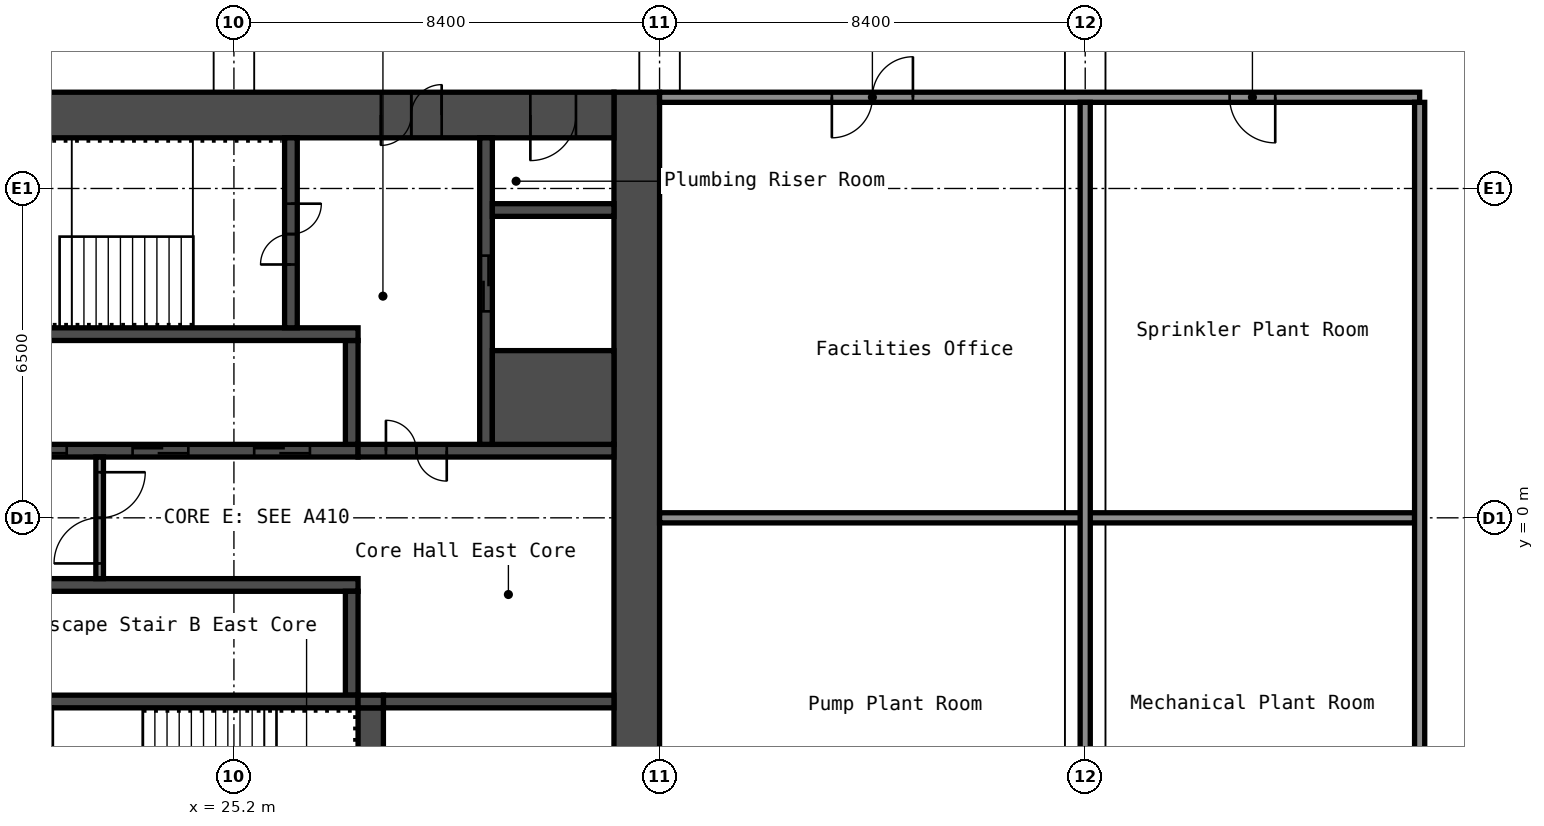
"""IFC4 building model, lengths in metres.
Left out: names, types, materials, properties, quantities, classifications, styles, units other than length and angle.
Written with IfcOpenShell. Run it as: python <this file> out.ifc"""

import sys

from ifc_helpers import new_model, si_unit, direction, frame, frame_2d, origin, place, context, subcontext, project, spatial, rectangle, extrude, element, fill, save


model = new_model("IFC4")
c1 = context("Model", 3, precision=1e-05, world=origin(), true_north=direction((0.0, 1.0)))
c2 = subcontext(c1, "Body", "Model", "MODEL_VIEW")
j1 = project(units=[si_unit("LENGTHUNIT", "METRE"), si_unit("PLANEANGLEUNIT", "RADIAN")], contexts=[c1])
p1 = place(None, origin())
s1 = spatial("IfcSite", under=j1, at=p1, CompositionType="ELEMENT")
p2 = place(p1, origin())
s2 = spatial("IfcBuilding", under=s1, at=p2, CompositionType="ELEMENT")
p3 = place(p2, frame((0.0, 0.0, 64.6)))
s3 = spatial("IfcBuildingStorey", under=s2, at=p3, CompositionType="ELEMENT", Elevation=64.6)
p4 = place(p3, frame((33.15, -8.4, 0.0), z_axis=(0.0, 0.0, 1.0), x_axis=(0.0, 1.0, 0.0)))
e1 = element("IfcWall", 1, at=p4, inside=s3, PredefinedType="SHEAR", context=c2, shape_type="SweptSolid", body=[
    extrude(rectangle(XDim=16.8, YDim=0.9, at=frame_2d((8.4, 0.0))), origin(), (0.0, 0.0, 1.0), 4.1),
])
p5 = place(p3, frame((17.7, 7.95, 0.0), z_axis=(0.0, 0.0, 1.0), x_axis=(1.0, 0.0, 0.0)))
e2 = element("IfcWall", 2, at=p5, inside=s3, PredefinedType="SHEAR", context=c2, shape_type="SweptSolid", body=[
    extrude(rectangle(XDim=15.0, YDim=0.9, at=frame_2d((7.5, 0.0))), origin(), (0.0, 0.0, 1.0), 4.1),
])
p6 = place(p5, frame((10.4, 0.0, 0.0)))
e3 = element("IfcOpeningElement", 3, at=p6, cuts=e2, PredefinedType="OPENING", context=c2, shape_type="SweptSolid", body=[
    extrude(rectangle(XDim=1.2, YDim=2.1, at=frame_2d((0.6, 1.05))), frame((0.0, 0.46, 0.0), z_axis=(0.0, -1.0, 0.0), x_axis=(1.0, 0.0, 0.0)), (0.0, 0.0, 1.0), 0.92),
])
p7 = place(p5, frame((13.35, 0.0, 0.0)))
e4 = element("IfcOpeningElement", 4, at=p7, cuts=e2, PredefinedType="OPENING", context=c2, shape_type="SweptSolid", body=[
    extrude(rectangle(XDim=0.9, YDim=2.1, at=frame_2d((0.45, 1.05))), frame((0.0, 0.46, 0.0), z_axis=(0.0, -1.0, 0.0), x_axis=(1.0, 0.0, 0.0)), (0.0, 0.0, 1.0), 0.92),
])
p8 = place(p3, frame((20.15, 1.325, 0.0), z_axis=(0.0, 0.0, 1.0), x_axis=(1.0, 0.0, 0.0)))
e5 = element("IfcWall", 5, at=p8, inside=s3, PredefinedType="SHEAR", context=c2, shape_type="SweptSolid", body=[
    extrude(rectangle(XDim=7.5, YDim=0.25, at=frame_2d((3.75, 0.0))), origin(), (0.0, 0.0, 1.0), 4.1),
])
p9 = place(p8, frame((0.65, 0.0, 0.0)))
e6 = element("IfcOpeningElement", 6, at=p9, cuts=e5, PredefinedType="OPENING", context=c2, shape_type="SweptSolid", body=[
    extrude(rectangle(XDim=1.1, YDim=2.1, at=frame_2d((0.55, 1.05))), frame((0.0, 0.135, 0.0), z_axis=(0.0, -1.0, 0.0), x_axis=(1.0, 0.0, 0.0)), (0.0, 0.0, 1.0), 0.27),
])
p10 = place(p8, frame((3.05, 0.0, 0.0)))
e7 = element("IfcOpeningElement", 7, at=p10, cuts=e5, PredefinedType="OPENING", context=c2, shape_type="SweptSolid", body=[
    extrude(rectangle(XDim=1.1, YDim=2.1, at=frame_2d((0.55, 1.05))), frame((0.0, 0.135, 0.0), z_axis=(0.0, -1.0, 0.0), x_axis=(1.0, 0.0, 0.0)), (0.0, 0.0, 1.0), 0.27),
])
p11 = place(p8, frame((5.45, 0.0, 0.0)))
e8 = element("IfcOpeningElement", 8, at=p11, cuts=e5, PredefinedType="OPENING", context=c2, shape_type="SweptSolid", body=[
    extrude(rectangle(XDim=1.1, YDim=2.1, at=frame_2d((0.55, 1.05))), frame((0.0, 0.135, 0.0), z_axis=(0.0, -1.0, 0.0), x_axis=(1.0, 0.0, 0.0)), (0.0, 0.0, 1.0), 0.27),
])
p12 = place(p3, frame((27.525, 1.45, 0.0), z_axis=(0.0, 0.0, 1.0), x_axis=(0.0, 1.0, 0.0)))
e9 = element("IfcWall", 9, at=p12, inside=s3, PredefinedType="SHEAR", context=c2, shape_type="SweptSolid", body=[
    extrude(rectangle(XDim=2.05, YDim=0.25, at=frame_2d((1.025, 0.0))), origin(), (0.0, 0.0, 1.0), 4.1),
])
p13 = place(p3, frame((20.15, 3.625, 0.0), z_axis=(0.0, 0.0, 1.0), x_axis=(1.0, 0.0, 0.0)))
e10 = element("IfcWall", 10, at=p13, inside=s3, PredefinedType="SHEAR", context=c2, shape_type="SweptSolid", body=[
    extrude(rectangle(XDim=7.5, YDim=0.25, at=frame_2d((3.75, 0.0))), origin(), (0.0, 0.0, 1.0), 4.1),
])
p14 = place(p3, frame((26.325, 3.75, 0.0), z_axis=(0.0, 0.0, 1.0), x_axis=(0.0, 1.0, 0.0)))
e11 = element("IfcWall", 11, at=p14, inside=s3, PredefinedType="SHEAR", context=c2, shape_type="SweptSolid", body=[
    extrude(rectangle(XDim=3.75, YDim=0.25, at=frame_2d((1.875, 0.0))), origin(), (0.0, 0.0, 1.0), 4.1),
])
p15 = place(p14, frame((1.25, 0.0, 0.0)))
e12 = element("IfcOpeningElement", 12, at=p15, cuts=e11, PredefinedType="OPENING", context=c2, shape_type="SweptSolid", body=[
    extrude(rectangle(XDim=1.2, YDim=2.1, at=frame_2d((0.6, 1.05))), frame((0.0, 0.135, 0.0), z_axis=(0.0, -1.0, 0.0), x_axis=(1.0, 0.0, 0.0)), (0.0, 0.0, 1.0), 0.27),
])
p16 = place(p3, frame((27.65, 1.325, 0.0), z_axis=(0.0, 0.0, 1.0), x_axis=(1.0, 0.0, 0.0)))
e13 = element("IfcWall", 13, at=p16, inside=s3, PredefinedType="SHEAR", context=c2, shape_type="SweptSolid", body=[
    extrude(rectangle(XDim=5.05, YDim=0.25, at=frame_2d((2.525, 0.0))), origin(), (0.0, 0.0, 1.0), 4.1),
])
p17 = place(p16, frame((0.55, 0.0, 0.0)))
e14 = element("IfcOpeningElement", 14, at=p17, cuts=e13, PredefinedType="OPENING", context=c2, shape_type="SweptSolid", body=[
    extrude(rectangle(XDim=1.2, YDim=2.1, at=frame_2d((0.6, 1.05))), frame((0.0, 0.135, 0.0), z_axis=(0.0, -1.0, 0.0), x_axis=(1.0, 0.0, 0.0)), (0.0, 0.0, 1.0), 0.27),
])
p18 = place(p3, frame((30.175, 1.45, 0.0), z_axis=(0.0, 0.0, 1.0), x_axis=(0.0, 1.0, 0.0)))
e15 = element("IfcWall", 15, at=p18, inside=s3, PredefinedType="SHEAR", context=c2, shape_type="SweptSolid", body=[
    extrude(rectangle(XDim=6.05, YDim=0.25, at=frame_2d((3.025, 0.0))), origin(), (0.0, 0.0, 1.0), 4.1),
])
p19 = place(p18, frame((2.625, 0.0, 0.0)))
e16 = element("IfcOpeningElement", 16, at=p19, cuts=e15, PredefinedType="OPENING", context=c2, shape_type="SweptSolid", body=[
    extrude(rectangle(XDim=1.1, YDim=2.1, at=frame_2d((0.55, 1.05))), frame((0.0, 0.135, 0.0), z_axis=(0.0, -1.0, 0.0), x_axis=(1.0, 0.0, 0.0)), (0.0, 0.0, 1.0), 0.27),
])
p20 = place(p3, frame((30.3, 2.375, 0.0), z_axis=(0.0, 0.0, 1.0), x_axis=(1.0, 0.0, 0.0)))
e17 = element("IfcWall", 17, at=p20, inside=s3, PredefinedType="SHEAR", context=c2, shape_type="SweptSolid", body=[
    extrude(rectangle(XDim=2.4, YDim=1.85, at=frame_2d((1.2, 0.0))), origin(), (0.0, 0.0, 1.0), 4.1),
])
p21 = place(p3, frame((30.3, 6.075, 0.0), z_axis=(0.0, 0.0, 1.0), x_axis=(1.0, 0.0, 0.0)))
e18 = element("IfcWall", 18, at=p21, inside=s3, PredefinedType="SHEAR", context=c2, shape_type="SweptSolid", body=[
    extrude(rectangle(XDim=2.4, YDim=0.25, at=frame_2d((1.2, 0.0))), origin(), (0.0, 0.0, 1.0), 4.1),
])
p22 = place(p3, frame((20.15, -1.325, 0.0), z_axis=(0.0, 0.0, 1.0), x_axis=(1.0, 0.0, 0.0)))
e19 = element("IfcWall", 19, at=p22, inside=s3, PredefinedType="SHEAR", context=c2, shape_type="SweptSolid", body=[
    extrude(rectangle(XDim=7.5, YDim=0.25, at=frame_2d((3.75, 0.0))), origin(), (0.0, 0.0, 1.0), 4.1),
])
p23 = place(p3, frame((27.525, -3.5, 0.0), z_axis=(0.0, 0.0, 1.0), x_axis=(0.0, 1.0, 0.0)))
e20 = element("IfcWall", 20, at=p23, inside=s3, PredefinedType="SHEAR", context=c2, shape_type="SweptSolid", body=[
    extrude(rectangle(XDim=2.05, YDim=0.25, at=frame_2d((1.025, 0.0))), origin(), (0.0, 0.0, 1.0), 4.1),
])
p24 = place(p3, frame((20.15, -3.625, 0.0), z_axis=(0.0, 0.0, 1.0), x_axis=(1.0, 0.0, 0.0)))
e21 = element("IfcWall", 21, at=p24, inside=s3, PredefinedType="SHEAR", context=c2, shape_type="SweptSolid", body=[
    extrude(rectangle(XDim=7.5, YDim=0.25, at=frame_2d((3.75, 0.0))), origin(), (0.0, 0.0, 1.0), 4.1),
])
p25 = place(p3, frame((27.9, -7.5, 0.0), z_axis=(0.0, 0.0, 1.0), x_axis=(0.0, 1.0, 0.0)))
e22 = element("IfcWall", 22, at=p25, inside=s3, PredefinedType="SHEAR", context=c2, shape_type="SweptSolid", body=[
    extrude(rectangle(XDim=3.75, YDim=0.5, at=frame_2d((1.875, 0.0))), origin(), (0.0, 0.0, 1.0), 4.1),
])
p26 = place(p3, frame((28.15, -3.625, 0.0), z_axis=(0.0, 0.0, 1.0), x_axis=(1.0, 0.0, 0.0)))
e23 = element("IfcWall", 23, at=p26, inside=s3, PredefinedType="SHEAR", context=c2, shape_type="SweptSolid", body=[
    extrude(rectangle(XDim=4.55, YDim=0.25, at=frame_2d((2.275, 0.0))), origin(), (0.0, 0.0, 1.0), 4.1),
])
p27 = place(p3, frame((27.65, -3.625, 0.0), z_axis=(0.0, 0.0, 1.0), x_axis=(1.0, 0.0, 0.0)))
e24 = element("IfcWall", 24, at=p27, inside=s3, PredefinedType="SHEAR", context=c2, shape_type="SweptSolid", body=[
    extrude(rectangle(XDim=0.5, YDim=0.25, at=frame_2d((0.25, 0.0))), origin(), (0.0, 0.0, 1.0), 4.1),
])
p28 = place(p3, frame((22.55, -1.2, 0.0), z_axis=(0.0, 0.0, 1.0), x_axis=(0.0, 1.0, 0.0)))
e25 = element("IfcWall", 25, at=p28, inside=s3, PredefinedType="PARTITIONING", context=c2, shape_type="SweptSolid", body=[
    extrude(rectangle(XDim=2.4, YDim=0.15, at=frame_2d((1.2, 0.0))), origin(), (0.0, 0.0, 1.0), 4.1),
])
p29 = place(p28, frame((0.3, 0.0, 0.0)))
e26 = element("IfcOpeningElement", 26, at=p29, cuts=e25, PredefinedType="OPENING", context=c2, shape_type="SweptSolid", body=[
    extrude(rectangle(XDim=1.8, YDim=2.1, at=frame_2d((0.9, 1.05))), frame((0.0, 0.085, 0.0), z_axis=(0.0, -1.0, 0.0), x_axis=(1.0, 0.0, 0.0)), (0.0, 0.0, 1.0), 0.17),
])
p30 = place(p3, frame((33.6, 0.0, 0.0), z_axis=(0.0, 0.0, 1.0), x_axis=(1.0, 0.0, 0.0)))
e27 = element("IfcWall", 27, at=p30, inside=s3, PredefinedType="PARTITIONING", context=c2, shape_type="SweptSolid", body=[
    extrude(rectangle(XDim=14.9, YDim=0.2, at=frame_2d((7.45, 0.0))), origin(), (0.0, 0.0, 1.0), 4.1),
])
p31 = place(p3, frame((33.6, 8.3, 0.0), z_axis=(0.0, 0.0, 1.0), x_axis=(1.0, 0.0, 0.0)))
e28 = element("IfcWall", 28, at=p31, inside=s3, PredefinedType="PARTITIONING", context=c2, shape_type="SweptSolid", body=[
    extrude(rectangle(XDim=15.0, YDim=0.2, at=frame_2d((7.5, 0.0))), origin(), (0.0, 0.0, 1.0), 4.1),
])
p32 = place(p31, frame((3.4, 0.0, 0.0)))
e29 = element("IfcOpeningElement", 29, at=p32, cuts=e28, PredefinedType="OPENING", context=c2, shape_type="SweptSolid", body=[
    extrude(rectangle(XDim=1.6, YDim=2.1, at=frame_2d((0.8, 1.05))), frame((0.0, 0.11, 0.0), z_axis=(0.0, -1.0, 0.0), x_axis=(1.0, 0.0, 0.0)), (0.0, 0.0, 1.0), 0.22),
])
p33 = place(p31, frame((11.25, 0.0, 0.0)))
e30 = element("IfcOpeningElement", 30, at=p33, cuts=e28, PredefinedType="OPENING", context=c2, shape_type="SweptSolid", body=[
    extrude(rectangle(XDim=0.9, YDim=2.1, at=frame_2d((0.45, 1.05))), frame((0.0, 0.11, 0.0), z_axis=(0.0, -1.0, 0.0), x_axis=(1.0, 0.0, 0.0)), (0.0, 0.0, 1.0), 0.22),
])
for number, where, z_axis, x_axis in (
    (31, (42.0, -8.2, 0.0), (0.0, 0.0, 1.0), (0.0, 1.0, 0.0)),
    (32, (48.6, -8.2, 0.0), (0.0, 0.0, 1.0), (0.0, 1.0, 0.0)),
):
    element("IfcWall", number, at=place(p3, frame(where, z_axis=z_axis, x_axis=x_axis)), inside=s3, PredefinedType="PARTITIONING", context=c2, shape_type="SweptSolid", body=[
        extrude(rectangle(XDim=16.4, YDim=0.2, at=frame_2d((8.2, 0.0))), origin(), (0.0, 0.0, 1.0), 4.1),
    ])
p34 = place(p6, origin())
e33 = element("IfcDoor", 33, at=p34, inside=s3, OperationType="DOUBLE_DOOR_SINGLE_SWING", PredefinedType="DOOR", context=c2, shape_type="SweptSolid", body=[
    extrude(rectangle(XDim=1.2, YDim=2.1, at=frame_2d((0.6, 1.05))), frame((0.0, 0.025, 0.0), z_axis=(0.0, -1.0, 0.0), x_axis=(1.0, 0.0, 0.0)), (0.0, 0.0, 1.0), 0.05),
])
fill(e3, e33)
p35 = place(p7, origin())
e34 = element("IfcDoor", 34, at=p35, inside=s3, OperationType="SINGLE_SWING_LEFT", PredefinedType="DOOR", context=c2, shape_type="SweptSolid", body=[
    extrude(rectangle(XDim=0.9, YDim=2.1, at=frame_2d((0.45, 1.05))), frame((0.0, 0.025, 0.0), z_axis=(0.0, -1.0, 0.0), x_axis=(1.0, 0.0, 0.0)), (0.0, 0.0, 1.0), 0.05),
])
fill(e4, e34)
p36 = place(p15, origin())
e35 = element("IfcDoor", 35, at=p36, inside=s3, OperationType="DOUBLE_DOOR_SINGLE_SWING", PredefinedType="DOOR", context=c2, shape_type="SweptSolid", body=[
    extrude(rectangle(XDim=1.2, YDim=2.1, at=frame_2d((0.6, 1.05))), frame((0.0, 0.025, 0.0), z_axis=(0.0, -1.0, 0.0), x_axis=(1.0, 0.0, 0.0)), (0.0, 0.0, 1.0), 0.05),
])
fill(e12, e35)
p37 = place(p17, origin())
e36 = element("IfcDoor", 36, at=p37, inside=s3, OperationType="DOUBLE_DOOR_SINGLE_SWING", PredefinedType="DOOR", context=c2, shape_type="SweptSolid", body=[
    extrude(rectangle(XDim=1.2, YDim=2.1, at=frame_2d((0.6, 1.05))), frame((0.0, 0.025, 0.0), z_axis=(0.0, -1.0, 0.0), x_axis=(1.0, 0.0, 0.0)), (0.0, 0.0, 1.0), 0.05),
])
fill(e14, e36)
p38 = place(p29, origin())
e37 = element("IfcDoor", 37, at=p38, inside=s3, OperationType="DOUBLE_DOOR_SINGLE_SWING", PredefinedType="DOOR", context=c2, shape_type="SweptSolid", body=[
    extrude(rectangle(XDim=1.8, YDim=2.1, at=frame_2d((0.9, 1.05))), frame((0.0, 0.025, 0.0), z_axis=(0.0, -1.0, 0.0), x_axis=(1.0, 0.0, 0.0)), (0.0, 0.0, 1.0), 0.05),
])
fill(e26, e37)
p39 = place(p9, origin())
e38 = element("IfcDoor", 38, at=p39, inside=s3, OperationType="DOUBLE_DOOR_SLIDING", PredefinedType="DOOR", context=c2, shape_type="SweptSolid", body=[
    extrude(rectangle(XDim=1.1, YDim=2.1, at=frame_2d((0.55, 1.05))), frame((0.0, 0.025, 0.0), z_axis=(0.0, -1.0, 0.0), x_axis=(1.0, 0.0, 0.0)), (0.0, 0.0, 1.0), 0.05),
])
fill(e6, e38)
p40 = place(p10, origin())
e39 = element("IfcDoor", 39, at=p40, inside=s3, OperationType="DOUBLE_DOOR_SLIDING", PredefinedType="DOOR", context=c2, shape_type="SweptSolid", body=[
    extrude(rectangle(XDim=1.1, YDim=2.1, at=frame_2d((0.55, 1.05))), frame((0.0, 0.025, 0.0), z_axis=(0.0, -1.0, 0.0), x_axis=(1.0, 0.0, 0.0)), (0.0, 0.0, 1.0), 0.05),
])
fill(e7, e39)
p41 = place(p11, origin())
e40 = element("IfcDoor", 40, at=p41, inside=s3, OperationType="DOUBLE_DOOR_SLIDING", PredefinedType="DOOR", context=c2, shape_type="SweptSolid", body=[
    extrude(rectangle(XDim=1.1, YDim=2.1, at=frame_2d((0.55, 1.05))), frame((0.0, 0.025, 0.0), z_axis=(0.0, -1.0, 0.0), x_axis=(1.0, 0.0, 0.0)), (0.0, 0.0, 1.0), 0.05),
])
fill(e8, e40)
p42 = place(p19, origin())
e41 = element("IfcDoor", 41, at=p42, inside=s3, OperationType="DOUBLE_DOOR_SLIDING", PredefinedType="DOOR", context=c2, shape_type="SweptSolid", body=[
    extrude(rectangle(XDim=1.1, YDim=2.1, at=frame_2d((0.55, 1.05))), frame((0.0, 0.025, 0.0), z_axis=(0.0, -1.0, 0.0), x_axis=(1.0, 0.0, 0.0)), (0.0, 0.0, 1.0), 0.05),
])
fill(e16, e41)
p43 = place(p32, origin())
e42 = element("IfcDoor", 42, at=p43, inside=s3, OperationType="DOUBLE_DOOR_SINGLE_SWING", PredefinedType="DOOR", context=c2, shape_type="SweptSolid", body=[
    extrude(rectangle(XDim=1.6, YDim=2.1, at=frame_2d((0.8, 1.05))), frame((0.0, 0.025, 0.0), z_axis=(0.0, -1.0, 0.0), x_axis=(1.0, 0.0, 0.0)), (0.0, 0.0, 1.0), 0.05),
])
fill(e29, e42)
p44 = place(p33, origin())
e43 = element("IfcDoor", 43, at=p44, inside=s3, OperationType="SINGLE_SWING_RIGHT", PredefinedType="DOOR", context=c2, shape_type="SweptSolid", body=[
    extrude(rectangle(XDim=0.9, YDim=2.1, at=frame_2d((0.45, 1.05))), frame((0.0, 0.025, 0.0), z_axis=(0.0, -1.0, 0.0), x_axis=(1.0, 0.0, 0.0)), (0.0, 0.0, 1.0), 0.05),
])
fill(e30, e43)
save(model, sys.argv[1])
